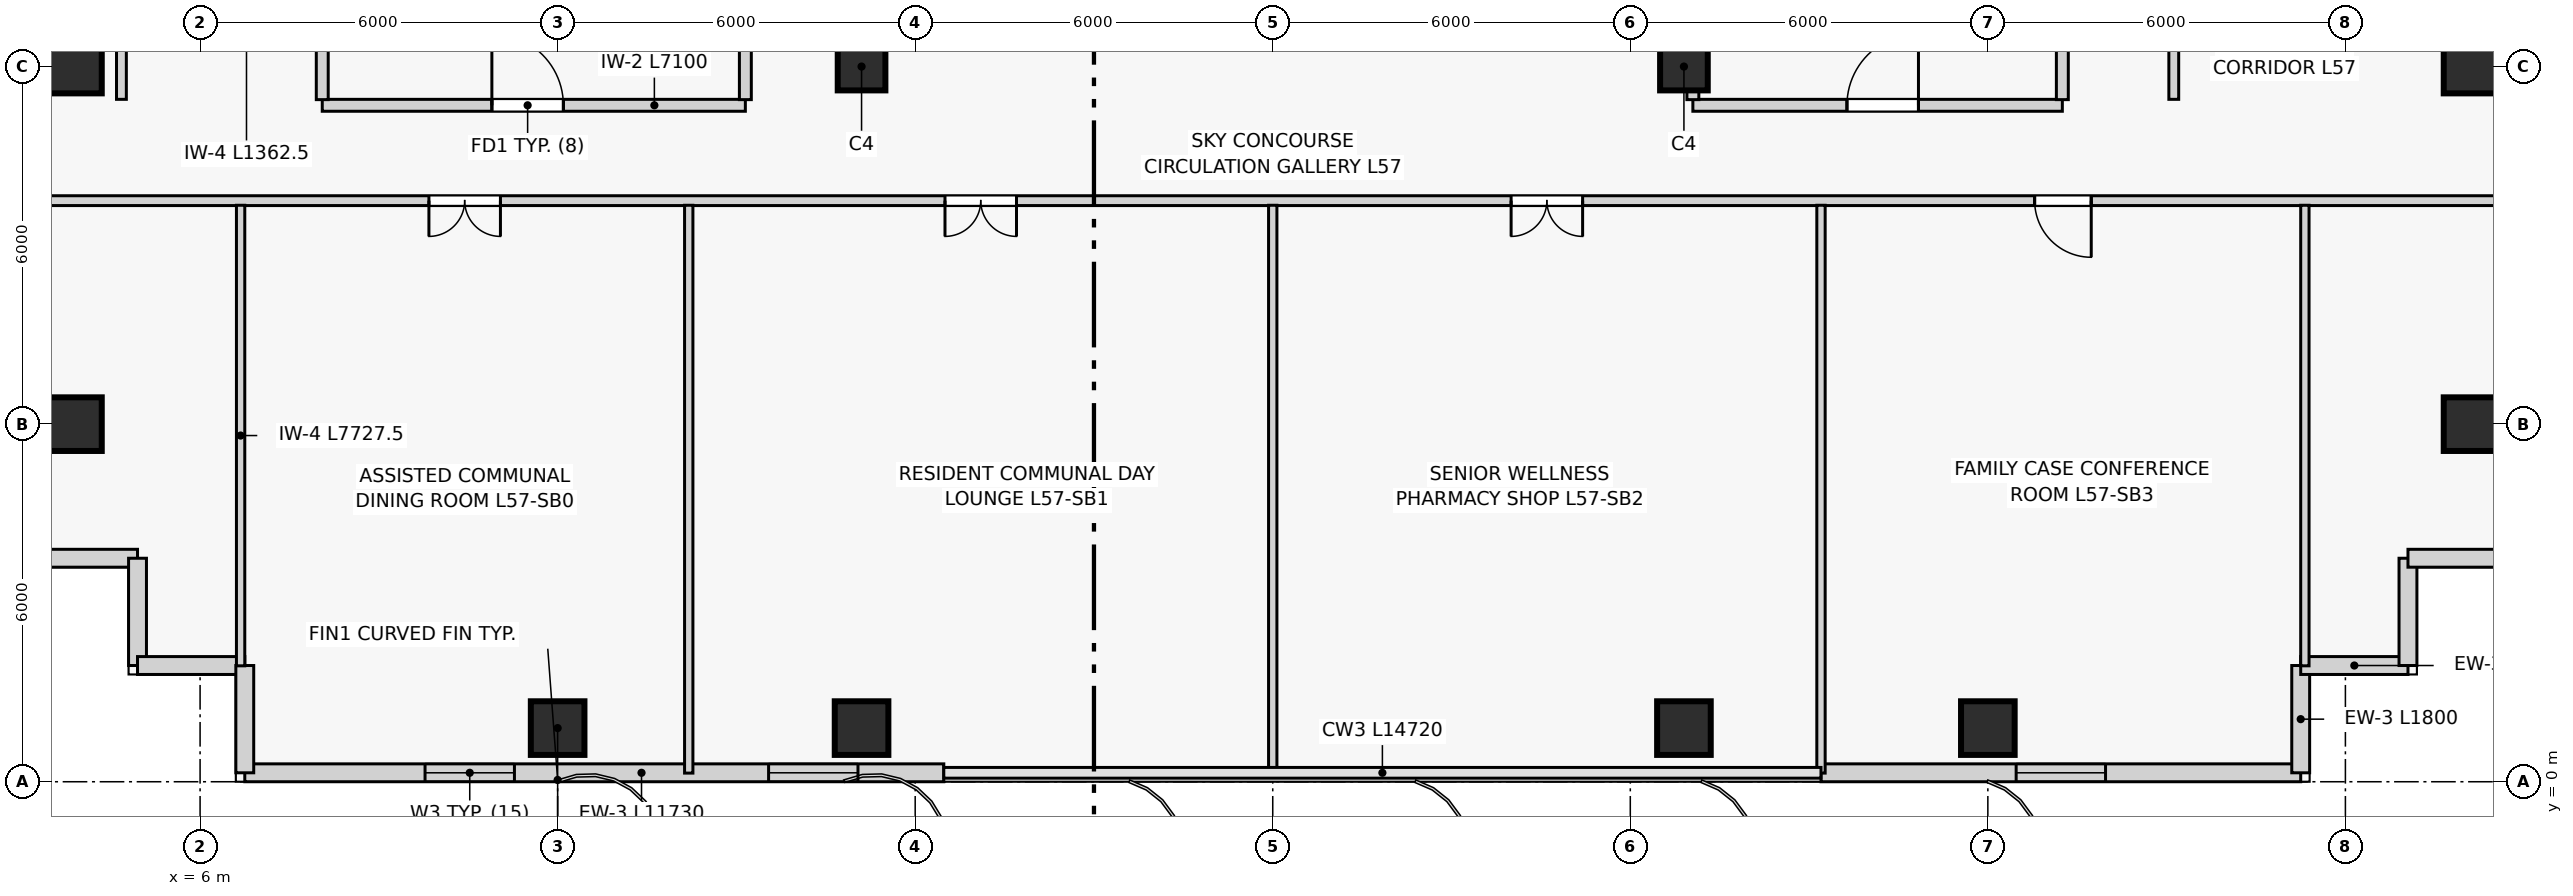
"""IFC4 building model, lengths in metres.
Left out: names, types, materials, properties, quantities, classifications, styles, units other than length and angle.
Written with IfcOpenShell. Run it as: python <this file> out.ifc"""

import sys

from ifc_helpers import new_model, si_unit, direction, frame, frame_2d, origin, origin_2d, place, context, subcontext, project, spatial, rectangle, extrude, source, transform, mapped, element, fill, save


model = new_model("IFC4")
c1 = context("Model", 3, precision=1e-05, world=origin(), true_north=direction((0.0, 1.0)))
c2 = subcontext(c1, "Body", "Model", "MODEL_VIEW")
j1 = project(units=[si_unit("LENGTHUNIT", "METRE"), si_unit("PLANEANGLEUNIT", "RADIAN")], contexts=[c1])
p1 = place(None, origin())
s1 = spatial("IfcSite", under=j1, at=p1, CompositionType="ELEMENT")
p2 = place(p1, origin())
s2 = spatial("IfcBuilding", under=s1, at=p2, CompositionType="ELEMENT")
p3 = place(p2, frame((0.0, 0.0, 216.9)))
s3 = spatial("IfcBuildingStorey", under=s2, at=p3, CompositionType="ELEMENT", Elevation=216.9)
m1 = source(origin(), c2, "Body", "SweptSolid", [
    extrude(rectangle(XDim=0.9, YDim=0.9, at=origin_2d()), origin(), (0.0, 0.0, 1.0), 3.6),
])
for number, where, z_axis, x_axis in (
    (1, (12.0, 0.9, 0.0), (0.0, 0.0, 1.0), (1.0, 0.0, 0.0)),
    (2, (17.1, 0.9, 0.0), (0.0, 0.0, 1.0), (1.0, 0.0, 0.0)),
    (3, (30.9, 0.9, 0.0), (0.0, 0.0, 1.0), (1.0, 0.0, 0.0)),
    (4, (36.0, 0.9, 0.0), (0.0, 0.0, 1.0), (1.0, 0.0, 0.0)),
    (5, (3.9, 6.0, 0.0), (0.0, 0.0, 1.0), (1.0, 0.0, 0.0)),
    (6, (44.1, 6.0, 0.0), (0.0, 0.0, 1.0), (1.0, 0.0, 0.0)),
    (7, (3.9, 12.0, 0.0), (0.0, 0.0, 1.0), (1.0, 0.0, 0.0)),
    (8, (44.1, 12.0, 0.0), (0.0, 0.0, 1.0), (1.0, 0.0, 0.0)),
):
    element("IfcColumn", number, at=place(p3, frame(where, z_axis=z_axis, x_axis=x_axis)), inside=s3, PredefinedType="COLUMN", context=c2, shape_type="MappedRepresentation", body=[
        mapped(m1, transform((0.0, 0.0, 0.0), scale=1.0)),
    ])
m2 = source(origin(), c2, "Body", "SweptSolid", [
    extrude(rectangle(XDim=0.8, YDim=0.8, at=origin_2d()), origin(), (0.0, 0.0, 1.0), 3.6),
])
for number, where, z_axis, x_axis in (
    (9, (17.1, 12.0, 0.0), (0.0, 0.0, 1.0), (1.0, 0.0, 0.0)),
    (10, (30.9, 12.0, 0.0), (0.0, 0.0, 1.0), (1.0, 0.0, 0.0)),
):
    element("IfcColumn", number, at=place(p3, frame(where, z_axis=z_axis, x_axis=x_axis)), inside=s3, PredefinedType="COLUMN", context=c2, shape_type="MappedRepresentation", body=[
        mapped(m2, transform((0.0, 0.0, 0.0), scale=1.0)),
    ])
p4 = place(p3, frame((6.75, 0.15, 0.0), z_axis=(0.0, 0.0, 1.0), x_axis=(1.0, 0.0, 0.0)))
e11 = element("IfcWall", 11, at=p4, inside=s3, PredefinedType="SOLIDWALL", context=c2, shape_type="SweptSolid", body=[
    extrude(rectangle(XDim=11.73, YDim=0.3, at=frame_2d((5.865, 0.0))), origin(), (0.0, 0.0, 1.0), 3.28),
])
p5 = place(p4, frame((3.025, 0.0, 0.85)))
e12 = element("IfcOpeningElement", 12, at=p5, cuts=e11, PredefinedType="OPENING", context=c2, shape_type="SweptSolid", body=[
    extrude(rectangle(XDim=1.5, YDim=1.8, at=frame_2d((0.75, 0.9))), frame((0.0, 0.16, 0.0), z_axis=(0.0, -1.0, 0.0), x_axis=(1.0, 0.0, 0.0)), (0.0, 0.0, 1.0), 0.32),
])
p6 = place(p4, frame((8.79, 0.0, 0.85)))
e13 = element("IfcOpeningElement", 13, at=p6, cuts=e11, PredefinedType="OPENING", context=c2, shape_type="SweptSolid", body=[
    extrude(rectangle(XDim=1.5, YDim=1.8, at=frame_2d((0.75, 0.9))), frame((0.0, 0.16, 0.0), z_axis=(0.0, -1.0, 0.0), x_axis=(1.0, 0.0, 0.0)), (0.0, 0.0, 1.0), 0.32),
])
p7 = place(p3, frame((33.2, 0.15, 0.0), z_axis=(0.0, 0.0, 1.0), x_axis=(1.0, 0.0, 0.0)))
e14 = element("IfcWall", 14, at=p7, inside=s3, PredefinedType="SOLIDWALL", context=c2, shape_type="SweptSolid", body=[
    extrude(rectangle(XDim=8.05, YDim=0.3, at=frame_2d((4.025, 0.0))), origin(), (0.0, 0.0, 1.0), 3.28),
])
p8 = place(p7, frame((3.275, 0.0, 0.85)))
e15 = element("IfcOpeningElement", 15, at=p8, cuts=e14, PredefinedType="OPENING", context=c2, shape_type="SweptSolid", body=[
    extrude(rectangle(XDim=1.5, YDim=1.8, at=frame_2d((0.75, 0.9))), frame((0.0, 0.16, 0.0), z_axis=(0.0, -1.0, 0.0), x_axis=(1.0, 0.0, 0.0)), (0.0, 0.0, 1.0), 0.32),
])
for number, where, z_axis, x_axis in (
    (16, (41.25, 0.15, 0.0), (0.0, 0.0, 1.0), (0.0, 1.0, 0.0)),
    (17, (41.25, 1.95, 0.0), (0.0, 0.0, 1.0), (1.0, 0.0, 0.0)),
    (18, (43.05, 1.95, 0.0), (0.0, 0.0, 1.0), (0.0, 1.0, 0.0)),
    (19, (43.05, 3.75, 0.0), (0.0, 0.0, 1.0), (1.0, 0.0, 0.0)),
    (20, (3.15, 3.75, 0.0), (0.0, 0.0, 1.0), (1.0, 0.0, 0.0)),
    (21, (4.95, 3.75, 0.0), (0.0, 0.0, 1.0), (0.0, -1.0, 0.0)),
    (22, (4.95, 1.95, 0.0), (0.0, 0.0, 1.0), (1.0, 0.0, 0.0)),
    (23, (6.75, 1.95, 0.0), (0.0, 0.0, 1.0), (0.0, -1.0, 0.0)),
):
    element("IfcWall", number, at=place(p3, frame(where, z_axis=z_axis, x_axis=x_axis)), inside=s3, PredefinedType="SOLIDWALL", context=c2, shape_type="SweptSolid", body=[
        extrude(rectangle(XDim=1.8, YDim=0.3, at=frame_2d((0.9, 0.0))), origin(), (0.0, 0.0, 1.0), 3.28),
    ])
p9 = place(p3, frame((8.05, 11.35, 0.0), z_axis=(0.0, 0.0, 1.0), x_axis=(1.0, 0.0, 0.0)))
e24 = element("IfcWall", 24, at=p9, inside=s3, PredefinedType="PARTITIONING", context=c2, shape_type="SweptSolid", body=[
    extrude(rectangle(XDim=7.1, YDim=0.2, at=frame_2d((3.55, 0.0))), origin(), (0.0, 0.0, 1.0), 3.28),
])
p10 = place(p9, frame((2.846, 0.0, 0.0)))
e25 = element("IfcOpeningElement", 25, at=p10, cuts=e24, PredefinedType="OPENING", context=c2, shape_type="SweptSolid", body=[
    extrude(rectangle(XDim=1.2, YDim=2.2, at=frame_2d((0.6, 1.1))), frame((0.0, 0.11, 0.0), z_axis=(0.0, -1.0, 0.0), x_axis=(1.0, 0.0, 0.0)), (0.0, 0.0, 1.0), 0.22),
])
for number, where, z_axis, x_axis in (
    (26, (8.05, 11.445, 0.0), (0.0, 0.0, 1.0), (0.0, 1.0, 0.0)),
    (27, (15.15, 11.445, 0.0), (0.0, 0.0, 1.0), (0.0, 1.0, 0.0)),
):
    element("IfcWall", number, at=place(p3, frame(where, z_axis=z_axis, x_axis=x_axis)), inside=s3, PredefinedType="PARTITIONING", context=c2, shape_type="SweptSolid", body=[
        extrude(rectangle(XDim=3.235, YDim=0.2, at=frame_2d((1.617, 0.0))), origin(), (0.0, 0.0, 1.0), 3.28),
    ])
p11 = place(p3, frame((31.05, 11.35, 0.0), z_axis=(0.0, 0.0, 1.0), x_axis=(1.0, 0.0, 0.0)))
e28 = element("IfcWall", 28, at=p11, inside=s3, PredefinedType="PARTITIONING", context=c2, shape_type="SweptSolid", body=[
    extrude(rectangle(XDim=6.2, YDim=0.2, at=frame_2d((3.1, 0.0))), origin(), (0.0, 0.0, 1.0), 3.28),
])
p12 = place(p11, frame((2.586, 0.0, 0.0)))
e29 = element("IfcOpeningElement", 29, at=p12, cuts=e28, PredefinedType="OPENING", context=c2, shape_type="SweptSolid", body=[
    extrude(rectangle(XDim=1.2, YDim=2.2, at=frame_2d((0.6, 1.1))), frame((0.0, 0.11, 0.0), z_axis=(0.0, -1.0, 0.0), x_axis=(1.0, 0.0, 0.0)), (0.0, 0.0, 1.0), 0.22),
])
p13 = place(p3, frame((31.05, 11.445, 0.0), z_axis=(0.0, 0.0, 1.0), x_axis=(0.0, 1.0, 0.0)))
e30 = element("IfcWall", 30, at=p13, inside=s3, PredefinedType="PARTITIONING", context=c2, shape_type="SweptSolid", body=[
    extrude(rectangle(XDim=3.235, YDim=0.2, at=frame_2d((1.617, 0.0))), origin(), (0.0, 0.0, 1.0), 2.821),
])
p14 = place(p3, frame((37.25, 11.445, 0.0), z_axis=(0.0, 0.0, 1.0), x_axis=(0.0, 1.0, 0.0)))
e31 = element("IfcWall", 31, at=p14, inside=s3, PredefinedType="PARTITIONING", context=c2, shape_type="SweptSolid", body=[
    extrude(rectangle(XDim=3.235, YDim=0.2, at=frame_2d((1.617, 0.0))), origin(), (0.0, 0.0, 1.0), 3.28),
])
p15 = place(p3, frame((3.145, 9.75, 0.0), z_axis=(0.0, 0.0, 1.0), x_axis=(1.0, 0.0, 0.0)))
e32 = element("IfcWall", 32, at=p15, inside=s3, PredefinedType="PARTITIONING", context=c2, shape_type="SweptSolid", body=[
    extrude(rectangle(XDim=41.71, YDim=0.165, at=frame_2d((20.855, 0.0))), origin(), (0.0, 0.0, 1.0), 3.28),
])
p16 = place(p15, frame((6.695, 0.0, 0.0)))
e33 = element("IfcOpeningElement", 33, at=p16, cuts=e32, PredefinedType="OPENING", context=c2, shape_type="SweptSolid", body=[
    extrude(rectangle(XDim=1.2, YDim=2.2, at=frame_2d((0.6, 1.1))), frame((0.0, 0.093, 0.0), z_axis=(0.0, -1.0, 0.0), x_axis=(1.0, 0.0, 0.0)), (0.0, 0.0, 1.0), 0.185),
])
p17 = place(p15, frame((15.355, 0.0, 0.0)))
e34 = element("IfcOpeningElement", 34, at=p17, cuts=e32, PredefinedType="OPENING", context=c2, shape_type="SweptSolid", body=[
    extrude(rectangle(XDim=1.2, YDim=2.2, at=frame_2d((0.6, 1.1))), frame((0.0, 0.093, 0.0), z_axis=(0.0, -1.0, 0.0), x_axis=(1.0, 0.0, 0.0)), (0.0, 0.0, 1.0), 0.185),
])
p18 = place(p15, frame((24.855, 0.0, 0.0)))
e35 = element("IfcOpeningElement", 35, at=p18, cuts=e32, PredefinedType="OPENING", context=c2, shape_type="SweptSolid", body=[
    extrude(rectangle(XDim=1.2, YDim=2.2, at=frame_2d((0.6, 1.1))), frame((0.0, 0.093, 0.0), z_axis=(0.0, -1.0, 0.0), x_axis=(1.0, 0.0, 0.0)), (0.0, 0.0, 1.0), 0.185),
])
p19 = place(p15, frame((33.64, 0.0, 0.0)))
e36 = element("IfcOpeningElement", 36, at=p19, cuts=e32, PredefinedType="OPENING", context=c2, shape_type="SweptSolid", body=[
    extrude(rectangle(XDim=0.95, YDim=2.1, at=frame_2d((0.475, 1.05))), frame((0.0, 0.093, 0.0), z_axis=(0.0, -1.0, 0.0), x_axis=(1.0, 0.0, 0.0)), (0.0, 0.0, 1.0), 0.185),
])
p20 = place(p3, frame((4.68, 11.45, 0.0), z_axis=(0.0, 0.0, 1.0), x_axis=(0.0, 1.0, 0.0)))
e37 = element("IfcWall", 37, at=p20, inside=s3, PredefinedType="PARTITIONING", context=c2, shape_type="SweptSolid", body=[
    extrude(rectangle(XDim=3.7, YDim=0.165, at=frame_2d((1.85, 0.0))), origin(), (0.0, 0.0, 1.0), 3.28),
])
p21 = place(p20, frame((1.475, 0.0, 0.0)))
e38 = element("IfcOpeningElement", 38, at=p21, cuts=e37, PredefinedType="OPENING", context=c2, shape_type="SweptSolid", body=[
    extrude(rectangle(XDim=0.95, YDim=2.1, at=frame_2d((0.475, 1.05))), frame((0.0, 0.093, 0.0), z_axis=(0.0, -1.0, 0.0), x_axis=(1.0, 0.0, 0.0)), (0.0, 0.0, 1.0), 0.185),
])
p22 = place(p3, frame((39.12, 11.45, 0.0), z_axis=(0.0, 0.0, 1.0), x_axis=(0.0, 1.0, 0.0)))
e39 = element("IfcWall", 39, at=p22, inside=s3, PredefinedType="PARTITIONING", context=c2, shape_type="SweptSolid", body=[
    extrude(rectangle(XDim=18.9, YDim=0.165, at=frame_2d((9.45, 0.0))), origin(), (0.0, 0.0, 1.0), 3.28),
])
p23 = place(p22, frame((2.05, 0.0, 0.0)))
e40 = element("IfcOpeningElement", 40, at=p23, cuts=e39, PredefinedType="OPENING", context=c2, shape_type="SweptSolid", body=[
    extrude(rectangle(XDim=0.95, YDim=2.1, at=frame_2d((0.475, 1.05))), frame((0.0, 0.093, 0.0), z_axis=(0.0, -1.0, 0.0), x_axis=(1.0, 0.0, 0.0)), (0.0, 0.0, 1.0), 0.185),
])
p24 = place(p3, frame((6.68, 1.945, 0.0), z_axis=(0.0, 0.0, 1.0), x_axis=(0.0, 1.0, 0.0)))
e41 = element("IfcWall", 41, at=p24, inside=s3, PredefinedType="PARTITIONING", context=c2, shape_type="SweptSolid", body=[
    extrude(rectangle(XDim=7.728, YDim=0.14, at=frame_2d((3.864, 0.0))), origin(), (0.0, 0.0, 1.0), 3.28),
])
for number, where, z_axis, x_axis in (
    (42, (14.2, 0.145, 0.0), (0.0, 0.0, 1.0), (0.0, 1.0, 0.0)),
    (43, (24.0, 0.145, 0.0), (0.0, 0.0, 1.0), (0.0, 1.0, 0.0)),
    (44, (33.2, 0.145, 0.0), (0.0, 0.0, 1.0), (0.0, 1.0, 0.0)),
):
    element("IfcWall", number, at=place(p3, frame(where, z_axis=z_axis, x_axis=x_axis)), inside=s3, PredefinedType="PARTITIONING", context=c2, shape_type="SweptSolid", body=[
        extrude(rectangle(XDim=9.528, YDim=0.14, at=frame_2d((4.764, 0.0))), origin(), (0.0, 0.0, 1.0), 3.28),
    ])
p25 = place(p3, frame((41.32, 1.945, 0.0), z_axis=(0.0, 0.0, 1.0), x_axis=(0.0, 1.0, 0.0)))
e45 = element("IfcWall", 45, at=p25, inside=s3, PredefinedType="PARTITIONING", context=c2, shape_type="SweptSolid", body=[
    extrude(rectangle(XDim=7.728, YDim=0.14, at=frame_2d((3.864, 0.0))), origin(), (0.0, 0.0, 1.0), 3.28),
])
m3 = source(origin(), c2, "Body", "SweptSolid", [
    extrude(rectangle(XDim=1.5, YDim=1.8, at=frame_2d((0.75, 0.9))), frame((0.0, 0.03, 0.0), z_axis=(0.0, -1.0, 0.0), x_axis=(1.0, 0.0, 0.0)), (0.0, 0.0, 1.0), 0.06),
])
p26 = place(p5, origin())
e46 = element("IfcWindow", 46, at=p26, inside=s3, PartitioningType="SINGLE_PANEL", PredefinedType="WINDOW", context=c2, shape_type="MappedRepresentation", body=[
    mapped(m3, transform((0.0, 0.0, 0.0), scale=1.0)),
])
fill(e12, e46)
p27 = place(p6, origin())
e47 = element("IfcWindow", 47, at=p27, inside=s3, PartitioningType="SINGLE_PANEL", PredefinedType="WINDOW", context=c2, shape_type="MappedRepresentation", body=[
    mapped(m3, transform((0.0, 0.0, 0.0), scale=1.0)),
])
fill(e13, e47)
p28 = place(p8, origin())
e48 = element("IfcWindow", 48, at=p28, inside=s3, PartitioningType="SINGLE_PANEL", PredefinedType="WINDOW", context=c2, shape_type="MappedRepresentation", body=[
    mapped(m3, transform((0.0, 0.0, 0.0), scale=1.0)),
])
fill(e15, e48)
m4 = source(origin(), c2, "Body", "SweptSolid", [
    extrude(rectangle(XDim=1.2, YDim=2.2, at=frame_2d((0.6, 1.1))), frame((0.0, 0.025, 0.0), z_axis=(0.0, -1.0, 0.0), x_axis=(1.0, 0.0, 0.0)), (0.0, 0.0, 1.0), 0.05),
])
p29 = place(p10, origin())
e49 = element("IfcDoor", 49, at=p29, inside=s3, OperationType="SINGLE_SWING_LEFT", PredefinedType="DOOR", context=c2, shape_type="MappedRepresentation", body=[
    mapped(m4, transform((0.0, 0.0, 0.0), scale=1.0)),
])
fill(e25, e49)
p30 = place(p12, origin())
e50 = element("IfcDoor", 50, at=p30, inside=s3, OperationType="SINGLE_SWING_RIGHT", PredefinedType="DOOR", context=c2, shape_type="MappedRepresentation", body=[
    mapped(m4, transform((0.0, 0.0, 0.0), scale=1.0)),
])
fill(e29, e50)
p31 = place(p16, frame((1.2, 0.0, 0.0), z_axis=(0.0, 0.0, 1.0), x_axis=(-1.0, 0.0, 0.0)))
e51 = element("IfcDoor", 51, at=p31, inside=s3, OperationType="DOUBLE_DOOR_SINGLE_SWING", PredefinedType="DOOR", context=c2, shape_type="MappedRepresentation", body=[
    mapped(m4, transform((0.0, 0.0, 0.0), scale=1.0)),
])
fill(e33, e51)
p32 = place(p17, frame((1.2, 0.0, 0.0), z_axis=(0.0, 0.0, 1.0), x_axis=(-1.0, 0.0, 0.0)))
e52 = element("IfcDoor", 52, at=p32, inside=s3, OperationType="DOUBLE_DOOR_SINGLE_SWING", PredefinedType="DOOR", context=c2, shape_type="MappedRepresentation", body=[
    mapped(m4, transform((0.0, 0.0, 0.0), scale=1.0)),
])
fill(e34, e52)
p33 = place(p18, frame((1.2, 0.0, 0.0), z_axis=(0.0, 0.0, 1.0), x_axis=(-1.0, 0.0, 0.0)))
e53 = element("IfcDoor", 53, at=p33, inside=s3, OperationType="DOUBLE_DOOR_SINGLE_SWING", PredefinedType="DOOR", context=c2, shape_type="MappedRepresentation", body=[
    mapped(m4, transform((0.0, 0.0, 0.0), scale=1.0)),
])
fill(e35, e53)
m5 = source(origin(), c2, "Body", "SweptSolid", [
    extrude(rectangle(XDim=0.95, YDim=2.1, at=frame_2d((0.475, 1.05))), frame((0.0, 0.025, 0.0), z_axis=(0.0, -1.0, 0.0), x_axis=(1.0, 0.0, 0.0)), (0.0, 0.0, 1.0), 0.05),
])
p34 = place(p19, frame((0.95, 0.0, 0.0), z_axis=(0.0, 0.0, 1.0), x_axis=(-1.0, 0.0, 0.0)))
e54 = element("IfcDoor", 54, at=p34, inside=s3, OperationType="SINGLE_SWING_LEFT", PredefinedType="DOOR", context=c2, shape_type="MappedRepresentation", body=[
    mapped(m5, transform((0.0, 0.0, 0.0), scale=1.0)),
])
fill(e36, e54)
save(model, sys.argv[1])
